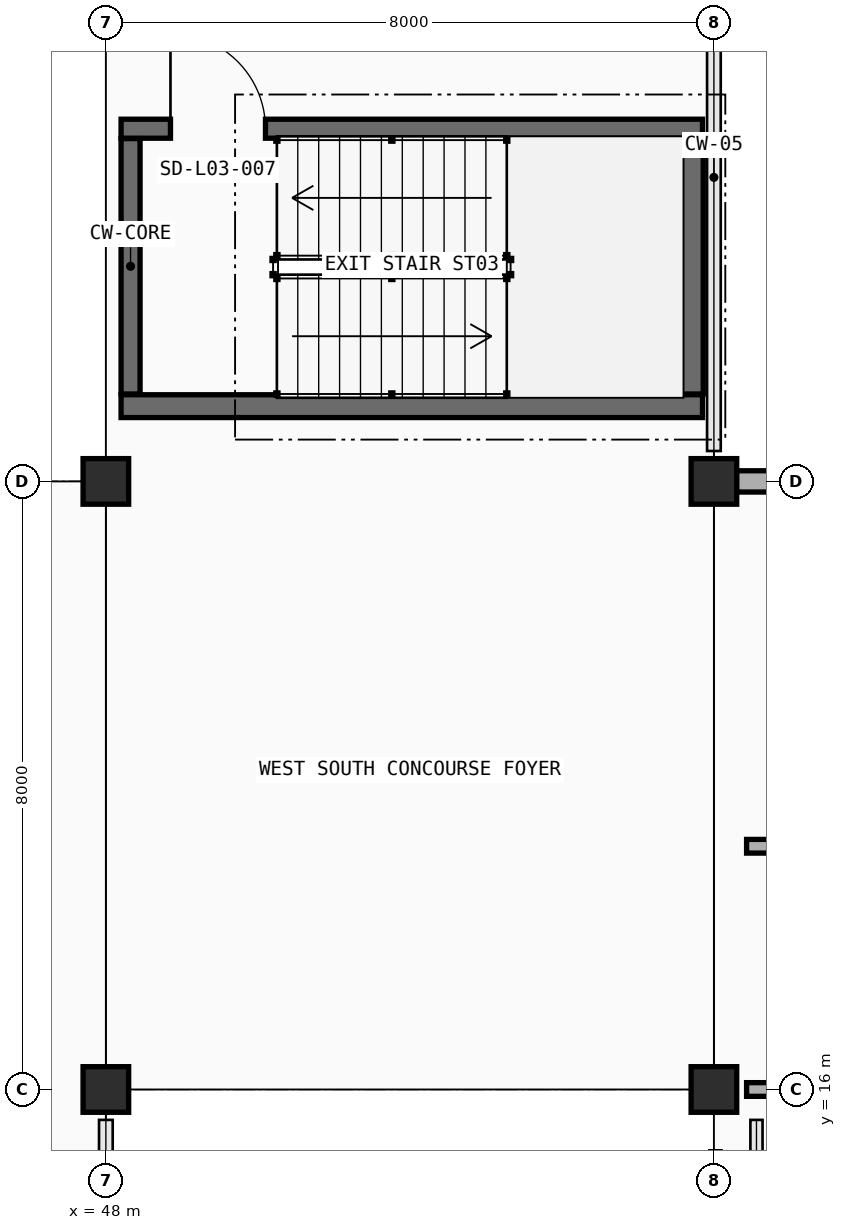
"""IFC4 building model, lengths in metres.
Left out: names, types, materials, properties, quantities, classifications, styles, units other than length and angle.
Written with IfcOpenShell. Run it as: python <this file> out.ifc"""

import sys

from ifc_helpers import new_model, si_unit, direction, frame, frame_2d, origin, origin_2d, place, context, subcontext, project, spatial, rectangle, extrude, element, fill, save


model = new_model("IFC4")
c1 = context("Model", 3, precision=1e-05, world=origin(), true_north=direction((0.0, 1.0)))
c2 = subcontext(c1, "Body", "Model", "MODEL_VIEW")
j1 = project(units=[si_unit("LENGTHUNIT", "METRE"), si_unit("PLANEANGLEUNIT", "RADIAN")], contexts=[c1])
p1 = place(None, origin())
s1 = spatial("IfcSite", under=j1, at=p1, CompositionType="ELEMENT")
p2 = place(p1, origin())
s2 = spatial("IfcBuilding", under=s1, at=p2, CompositionType="ELEMENT")
p3 = place(p2, frame((0.0, 0.0, 9.6)))
s3 = spatial("IfcBuildingStorey", under=s2, at=p3, CompositionType="ELEMENT", Elevation=9.6)
for number, where, z_axis, x_axis in (
    (1, (48.0, 16.0, 0.0), (0.0, 0.0, 1.0), (1.0, 0.0, 0.0)),
    (2, (56.0, 16.0, 0.0), (0.0, 0.0, 1.0), (1.0, 0.0, 0.0)),
    (3, (48.0, 24.0, 0.0), (0.0, 0.0, 1.0), (1.0, 0.0, 0.0)),
    (4, (56.0, 24.0, 0.0), (0.0, 0.0, 1.0), (1.0, 0.0, 0.0)),
):
    element("IfcColumn", number, at=place(p3, frame(where, z_axis=z_axis, x_axis=x_axis)), inside=s3, PredefinedType="COLUMN", context=c2, shape_type="SweptSolid", body=[
        extrude(rectangle(XDim=0.6, YDim=0.6, at=origin_2d()), origin(), (0.0, 0.0, 1.0), 4.2),
    ])
p4 = place(p3, frame((56.297, 24.0, 0.0), z_axis=(0.0, 0.0, 1.0), x_axis=(1.0, 0.0, 0.0)))
e5 = element("IfcWall", 5, at=p4, inside=s3, PredefinedType="STANDARD", context=c2, shape_type="SweptSolid", body=[
    extrude(rectangle(XDim=7.406, YDim=0.28, at=frame_2d((3.703, 0.0))), origin(), (0.0, 0.0, 1.0), 3.325),
])
p5 = place(p4, frame((2.283, 0.0, 0.9)))
e6 = element("IfcOpeningElement", 6, at=p5, cuts=e5, PredefinedType="OPENING", context=c2, shape_type="SweptSolid", body=[
    extrude(rectangle(XDim=2.85, YDim=1.25, at=frame_2d((1.425, 0.625))), frame((0.0, 0.15, 0.0), z_axis=(0.0, -1.0, 0.0), x_axis=(1.0, 0.0, 0.0)), (0.0, 0.0, 1.0), 0.3),
])
p6 = place(p3, frame((56.24, 15.78, 0.0), z_axis=(0.0, 0.0, 1.0), x_axis=(1.0, 0.0, 0.0)))
e7 = element("IfcWall", 7, at=p6, inside=s3, PredefinedType="PARAPET", context=c2, shape_type="SweptSolid", body=[
    extrude(rectangle(XDim=0.32, YDim=0.2, at=frame_2d((0.16, 0.0))), origin(), (0.0, 0.0, 1.0), 3.35),
])
p7 = place(p3, frame((48.2, 24.99, 0.0), z_axis=(0.0, 0.0, 1.0), x_axis=(1.0, 0.0, 0.0)))
e8 = element("IfcWall", 8, at=p7, inside=s3, PredefinedType="SHEAR", context=c2, shape_type="SweptSolid", body=[
    extrude(rectangle(XDim=7.65, YDim=0.3, at=frame_2d((3.825, 0.0))), origin(), (0.0, 0.0, 1.0), 4.2),
])
p8 = place(p3, frame((55.71, 25.15, 0.0), z_axis=(0.0, 0.0, 1.0), x_axis=(0.0, 1.0, 0.0)))
e9 = element("IfcWall", 9, at=p8, inside=s3, PredefinedType="SHEAR", context=c2, shape_type="SweptSolid", body=[
    extrude(rectangle(XDim=3.36, YDim=0.3, at=frame_2d((1.68, 0.0))), origin(), (0.0, 0.0, 1.0), 4.2),
])
p9 = place(p3, frame((48.2, 28.64, 0.0), z_axis=(0.0, 0.0, 1.0), x_axis=(1.0, 0.0, 0.0)))
e10 = element("IfcWall", 10, at=p9, inside=s3, PredefinedType="SOLIDWALL", context=c2, shape_type="SweptSolid", body=[
    extrude(rectangle(XDim=7.65, YDim=0.25, at=frame_2d((3.825, 0.0))), origin(), (0.0, 0.0, 1.0), 4.2),
])
p10 = place(p9, frame((0.65, 0.0, 0.0)))
e11 = element("IfcOpeningElement", 11, at=p10, cuts=e10, PredefinedType="OPENING", context=c2, shape_type="SweptSolid", body=[
    extrude(rectangle(XDim=1.25, YDim=2.15, at=frame_2d((0.625, 1.075))), frame((0.0, 0.135, 0.0), z_axis=(0.0, -1.0, 0.0), x_axis=(1.0, 0.0, 0.0)), (0.0, 0.0, 1.0), 0.27),
])
p11 = place(p3, frame((48.325, 25.15, 0.0), z_axis=(0.0, 0.0, 1.0), x_axis=(0.0, 1.0, 0.0)))
e12 = element("IfcWall", 12, at=p11, inside=s3, PredefinedType="SOLIDWALL", context=c2, shape_type="SweptSolid", body=[
    extrude(rectangle(XDim=3.36, YDim=0.25, at=frame_2d((1.68, 0.0))), origin(), (0.0, 0.0, 1.0), 4.2),
])
p12 = place(p3, frame((56.43, 16.0, 0.0), z_axis=(0.0, 0.0, 1.0), x_axis=(1.0, 0.0, 0.0)))
e13 = element("IfcWall", 13, at=p12, inside=s3, PredefinedType="PARTITIONING", context=c2, shape_type="SweptSolid", body=[
    extrude(rectangle(XDim=15.14, YDim=0.18, at=frame_2d((7.57, 0.0))), origin(), (0.0, 0.0, 1.0), 3.275),
])
p13 = place(p12, frame((3.12, 0.0, 0.0)))
e14 = element("IfcOpeningElement", 14, at=p13, cuts=e13, PredefinedType="OPENING", context=c2, shape_type="SweptSolid", body=[
    extrude(rectangle(XDim=0.9, YDim=2.1, at=frame_2d((0.45, 1.05))), frame((0.0, 0.1, 0.0), z_axis=(0.0, -1.0, 0.0), x_axis=(1.0, 0.0, 0.0)), (0.0, 0.0, 1.0), 0.2),
])
p14 = place(p3, frame((56.43, 19.2, 0.0), z_axis=(0.0, 0.0, 1.0), x_axis=(1.0, 0.0, 0.0)))
e15 = element("IfcWall", 15, at=p14, inside=s3, PredefinedType="PARTITIONING", context=c2, shape_type="SweptSolid", body=[
    extrude(rectangle(XDim=23.14, YDim=0.18, at=frame_2d((11.57, 0.0))), origin(), (0.0, 0.0, 1.0), 3.3),
])
p15 = place(p14, frame((3.07, 0.0, 0.0)))
e16 = element("IfcOpeningElement", 16, at=p15, cuts=e15, PredefinedType="OPENING", context=c2, shape_type="SweptSolid", body=[
    extrude(rectangle(XDim=1.0, YDim=2.15, at=frame_2d((0.5, 1.075))), frame((0.0, 0.1, 0.0), z_axis=(0.0, -1.0, 0.0), x_axis=(1.0, 0.0, 0.0)), (0.0, 0.0, 1.0), 0.2),
])
p16 = place(p10, origin())
e17 = element("IfcDoor", 17, at=p16, inside=s3, OperationType="SINGLE_SWING_LEFT", PredefinedType="DOOR", context=c2, shape_type="SweptSolid", body=[
    extrude(rectangle(XDim=1.25, YDim=2.15, at=frame_2d((0.625, 1.075))), frame((0.0, 0.025, 0.0), z_axis=(0.0, -1.0, 0.0), x_axis=(1.0, 0.0, 0.0)), (0.0, 0.0, 1.0), 0.05),
])
fill(e11, e17)
save(model, sys.argv[1])
